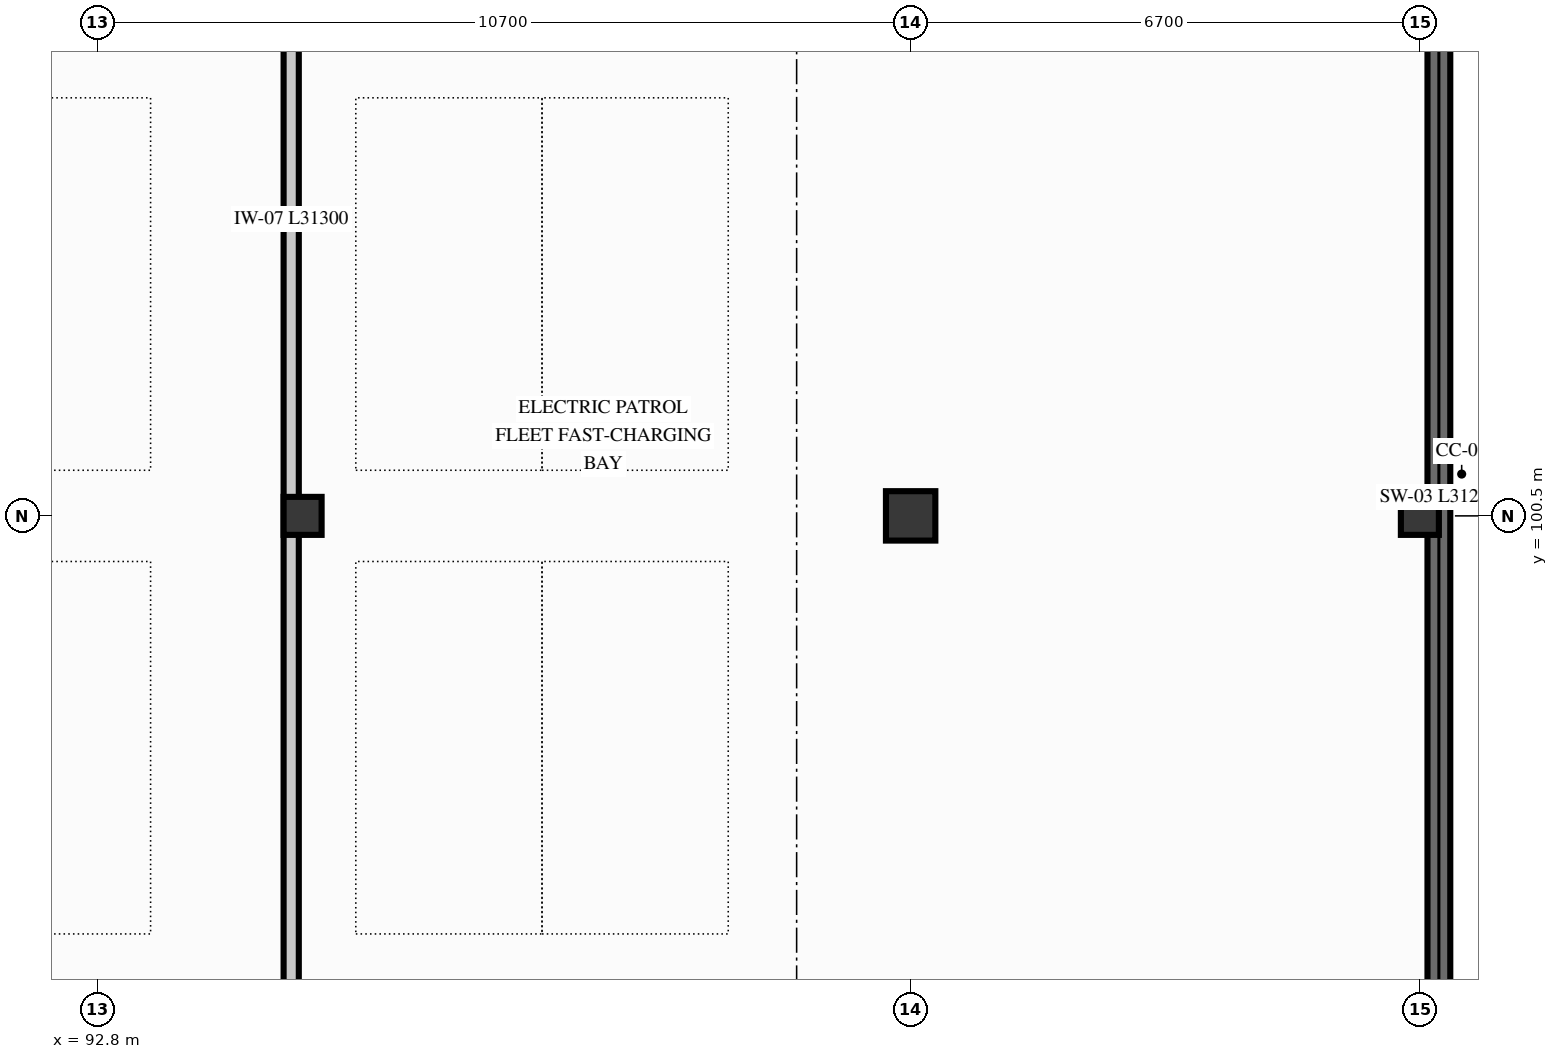
"""IFC4 building model, lengths in metres.
Left out: names, types, materials, properties, quantities, classifications, styles, units other than length and angle.
Written with IfcOpenShell. Run it as: python <this file> out.ifc"""

import sys

from ifc_helpers import new_model, si_unit, direction, frame, frame_2d, origin, origin_2d, place, context, subcontext, project, spatial, rectangle, extrude, element, save


model = new_model("IFC4")
c1 = context("Model", 3, precision=1e-05, world=origin(), true_north=direction((0.0, 1.0)))
c2 = subcontext(c1, "Body", "Model", "MODEL_VIEW")
j1 = project(units=[si_unit("LENGTHUNIT", "METRE"), si_unit("PLANEANGLEUNIT", "RADIAN")], contexts=[c1])
p1 = place(None, origin())
s1 = spatial("IfcSite", under=j1, at=p1, CompositionType="ELEMENT")
p2 = place(p1, origin())
s2 = spatial("IfcBuilding", under=s1, at=p2, CompositionType="ELEMENT")
p3 = place(p2, frame((0.0, 0.0, -4.2)))
s3 = spatial("IfcBuildingStorey", under=s2, at=p3, CompositionType="ELEMENT", Elevation=-4.2)
p4 = place(p3, frame((103.5, 100.5, 0.0), z_axis=(0.0, 0.0, 1.0), x_axis=(1.0, 0.0, 0.0)))
e1 = element("IfcColumn", 1, at=p4, inside=s3, PredefinedType="COLUMN", context=c2, shape_type="SweptSolid", body=[
    extrude(rectangle(XDim=0.65, YDim=0.65, at=origin_2d()), origin(), (0.0, 0.0, 1.0), 4.2),
])
p5 = place(p3, frame((110.2, 100.5, 0.0), z_axis=(0.0, 0.0, 1.0), x_axis=(1.0, 0.0, 0.0)))
e2 = element("IfcColumn", 2, at=p5, inside=s3, PredefinedType="COLUMN", context=c2, shape_type="SweptSolid", body=[
    extrude(rectangle(XDim=0.5, YDim=0.5, at=origin_2d()), origin(), (0.0, 0.0, 1.0), 4.2),
])
p6 = place(p3, frame((95.5, 100.5, 0.0), z_axis=(0.0, 0.0, 1.0), x_axis=(1.0, 0.0, 0.0)))
e3 = element("IfcColumn", 3, at=p6, inside=s3, PredefinedType="COLUMN", context=c2, shape_type="SweptSolid", body=[
    extrude(rectangle(XDim=0.5, YDim=0.5, at=origin_2d()), origin(), (0.0, 0.0, 1.0), 3.9),
])
p7 = place(p3, frame((110.45, 85.15, 0.0), z_axis=(0.0, 0.0, 1.0), x_axis=(0.0, 1.0, 0.0)))
e4 = element("IfcWall", 4, at=p7, inside=s3, PredefinedType="SHEAR", context=c2, shape_type="SweptSolid", body=[
    extrude(rectangle(XDim=31.2, YDim=0.3, at=frame_2d((15.6, 0.0))), origin(), (0.0, 0.0, 1.0), 3.88),
])
p8 = place(p3, frame((95.35, 85.2, 0.0), z_axis=(0.0, 0.0, 1.0), x_axis=(0.0, 1.0, 0.0)))
e5 = element("IfcWall", 5, at=p8, inside=s3, PredefinedType="PARTITIONING", context=c2, shape_type="SweptSolid", body=[
    extrude(rectangle(XDim=31.3, YDim=0.2, at=frame_2d((15.65, 0.0))), origin(), (0.0, 0.0, 1.0), 2.97),
])
p9 = place(p8, frame((6.0, 0.0, 0.0)))
e6 = element("IfcOpeningElement", 6, at=p9, cuts=e5, PredefinedType="OPENING", context=c2, shape_type="SweptSolid", body=[
    extrude(rectangle(XDim=1.12, YDim=2.2, at=frame_2d((0.56, 1.1))), frame((0.0, 0.11, 0.0), z_axis=(0.0, -1.0, 0.0), x_axis=(1.0, 0.0, 0.0)), (0.0, 0.0, 1.0), 0.22),
])
save(model, sys.argv[1])
